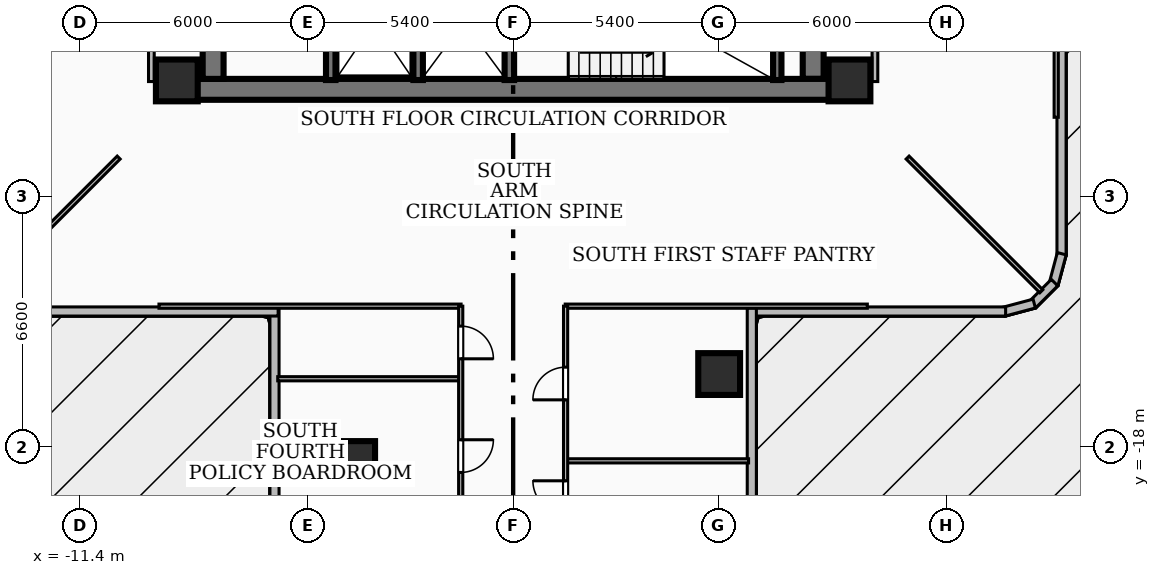
"""IFC4 building model, lengths in metres.
Left out: names, types, materials, properties, quantities, classifications, styles, units other than length and angle.
Written with IfcOpenShell. Run it as: python <this file> out.ifc"""

import sys

from ifc_helpers import new_model, si_unit, direction, frame, frame_2d, origin, origin_2d, place, context, subcontext, project, spatial, rectangle, extrude, element, fill, save


model = new_model("IFC4")
c1 = context("Model", 3, precision=1e-05, world=origin(), true_north=direction((0.0, 1.0)))
c2 = subcontext(c1, "Body", "Model", "MODEL_VIEW")
j1 = project(units=[si_unit("LENGTHUNIT", "METRE"), si_unit("PLANEANGLEUNIT", "RADIAN")], contexts=[c1])
p1 = place(None, origin())
s1 = spatial("IfcSite", under=j1, at=p1, CompositionType="ELEMENT")
p2 = place(p1, origin())
s2 = spatial("IfcBuilding", under=s1, at=p2, CompositionType="ELEMENT")
p3 = place(p2, frame((0.0, 0.0, 24.48)))
s3 = spatial("IfcBuildingStorey", under=s2, at=p3, CompositionType="ELEMENT", Elevation=24.48)
p4 = place(p3, frame((8.78, -8.585, 0.0), z_axis=(0.0, 0.0, 1.0), x_axis=(-1.0, 0.0, 0.0)))
e1 = element("IfcWall", 1, at=p4, inside=s3, PredefinedType="SHEAR", context=c2, shape_type="SweptSolid", body=[
    extrude(rectangle(XDim=17.56, YDim=0.55, at=frame_2d((8.78, 0.0))), origin(), (0.0, 0.0, 1.0), 3.34),
])
for number, where, z_axis, x_axis in (
    (2, (-7.895, -8.31, 0.0), (0.0, 0.0, 1.0), (0.0, 1.0, 0.0)),
    (3, (7.895, -2.025, 0.0), (0.0, 0.0, 1.0), (0.0, -1.0, 0.0)),
):
    element("IfcWall", number, at=place(p3, frame(where, z_axis=z_axis, x_axis=x_axis)), inside=s3, PredefinedType="SHEAR", context=c2, shape_type="SweptSolid", body=[
        extrude(rectangle(XDim=6.285, YDim=0.55, at=frame_2d((3.143, 0.0))), origin(), (0.0, 0.0, 1.0), 3.34),
    ])
p5 = place(p3, frame((6.95, -8.34, 0.0), z_axis=(0.0, 0.0, 1.0), x_axis=(0.0, 1.0, 0.0)))
e4 = element("IfcWall", 4, at=p5, inside=s3, PredefinedType="SOLIDWALL", context=c2, shape_type="SweptSolid", body=[
    extrude(rectangle(XDim=3.06, YDim=0.22, at=frame_2d((1.53, 0.0))), origin(), (0.0, 0.0, 1.0), 3.34),
])
for number, where, z_axis, x_axis in (
    (5, (-0.1, -8.34, 0.0), (0.0, 0.0, 1.0), (0.0, 1.0, 0.0)),
    (6, (-2.5, -8.34, 0.0), (0.0, 0.0, 1.0), (0.0, 1.0, 0.0)),
    (7, (-4.8, -8.34, 0.0), (0.0, 0.0, 1.0), (0.0, 1.0, 0.0)),
):
    element("IfcWall", number, at=place(p3, frame(where, z_axis=z_axis, x_axis=x_axis)), inside=s3, PredefinedType="SOLIDWALL", context=c2, shape_type="SweptSolid", body=[
        extrude(rectangle(XDim=3.04, YDim=0.25, at=frame_2d((1.52, 0.0))), origin(), (0.0, 0.0, 1.0), 3.34),
    ])
for number, where, z_axis, x_axis in (
    (8, (8.85, -8.35, 0.0), (0.0, 0.0, 1.0), (1.0, 0.0, 0.0)),
    (9, (-8.85, -8.35, 0.0), (0.0, 0.0, 1.0), (1.0, 0.0, 0.0)),
    (10, (-4.184, -18.391, 0.0), (0.0, 0.0, 1.0), (1.0, 0.0, 0.0)),
    (11, (5.421, -16.076, 0.0), (0.0, 0.0, 1.0), (1.0, 0.0, 0.0)),
):
    element("IfcColumn", number, at=place(p3, frame(where, z_axis=z_axis, x_axis=x_axis)), inside=s3, PredefinedType="COLUMN", context=c2, shape_type="SweptSolid", body=[
        extrude(rectangle(XDim=1.1, YDim=1.1, at=origin_2d()), origin(), (0.0, 0.0, 1.0), 3.6),
    ])
p6 = place(p3, frame((14.43, -6.184, 0.0), z_axis=(0.0, 0.0, 1.0), x_axis=(0.0, -1.0, 0.0)))
e12 = element("IfcWall", 12, at=p6, inside=s3, PredefinedType="SOLIDWALL", context=c2, shape_type="SweptSolid", body=[
    extrude(rectangle(XDim=6.775, YDim=0.24, at=frame_2d((3.387, 0.0))), origin(), (0.0, 0.0, 1.0), 3.34),
])
p7 = place(p3, frame((14.436, -12.91, 0.0), z_axis=(0.0, 0.0, 1.0), x_axis=(-0.257937227116, -0.966161677396, 0.0)))
e13 = element("IfcWall", 13, at=p7, inside=s3, PredefinedType="SOLIDWALL", context=c2, shape_type="SweptSolid", body=[
    extrude(rectangle(XDim=0.83, YDim=0.24, at=frame_2d((0.415, 0.0))), origin(), (0.0, 0.0, 1.0), 3.34),
])
p8 = place(p3, frame((14.246, -13.67, 0.0), z_axis=(0.0, 0.0, 1.0), x_axis=(-0.707106781187, -0.707106781187, 0.0)))
e14 = element("IfcWall", 14, at=p8, inside=s3, PredefinedType="SOLIDWALL", context=c2, shape_type="SweptSolid", body=[
    extrude(rectangle(XDim=0.815, YDim=0.24, at=frame_2d((0.407, 0.0))), origin(), (0.0, 0.0, 1.0), 3.34),
])
p9 = place(p3, frame((13.712, -14.222, 0.0), z_axis=(0.0, 0.0, 1.0), x_axis=(-0.966161677396, -0.257937227116, 0.0)))
e15 = element("IfcWall", 15, at=p9, inside=s3, PredefinedType="SOLIDWALL", context=c2, shape_type="SweptSolid", body=[
    extrude(rectangle(XDim=0.83, YDim=0.24, at=frame_2d((0.415, 0.0))), origin(), (0.0, 0.0, 1.0), 3.34),
])
p10 = place(p3, frame((12.959, -14.43, 0.0), z_axis=(0.0, 0.0, 1.0), x_axis=(-1.0, 0.0, 0.0)))
e16 = element("IfcWall", 16, at=p10, inside=s3, PredefinedType="SOLIDWALL", context=c2, shape_type="SweptSolid", body=[
    extrude(rectangle(XDim=6.775, YDim=0.24, at=frame_2d((3.387, 0.0))), origin(), (0.0, 0.0, 1.0), 2.421),
])
p11 = place(p3, frame((6.28, -14.334, 0.0), z_axis=(0.0, 0.0, 1.0), x_axis=(0.0, -1.0, 0.0)))
e17 = element("IfcWall", 17, at=p11, inside=s3, PredefinedType="SOLIDWALL", context=c2, shape_type="SweptSolid", body=[
    extrude(rectangle(XDim=13.475, YDim=0.24, at=frame_2d((6.738, 0.0))), origin(), (0.0, 0.0, 1.0), 2.421),
])
p12 = place(p3, frame((-6.28, -27.809, 0.0), z_axis=(0.0, 0.0, 1.0), x_axis=(0.0, 1.0, 0.0)))
e18 = element("IfcWall", 18, at=p12, inside=s3, PredefinedType="SOLIDWALL", context=c2, shape_type="SweptSolid", body=[
    extrude(rectangle(XDim=13.475, YDim=0.24, at=frame_2d((6.738, 0.0))), origin(), (0.0, 0.0, 1.0), 3.34),
])
p13 = place(p12, frame((1.1, 0.0, 0.85)))
e19 = element("IfcOpeningElement", 19, at=p13, cuts=e18, PredefinedType="OPENING", context=c2, shape_type="SweptSolid", body=[
    extrude(rectangle(XDim=1.5, YDim=1.8, at=frame_2d((0.75, 0.9))), frame((0.0, 0.13, 0.0), z_axis=(0.0, -1.0, 0.0), x_axis=(1.0, 0.0, 0.0)), (0.0, 0.0, 1.0), 0.26),
])
p14 = place(p3, frame((-6.184, -14.43, 0.0), z_axis=(0.0, 0.0, 1.0), x_axis=(-1.0, 0.0, 0.0)))
e20 = element("IfcWall", 20, at=p14, inside=s3, PredefinedType="SOLIDWALL", context=c2, shape_type="SweptSolid", body=[
    extrude(rectangle(XDim=6.775, YDim=0.24, at=frame_2d((3.387, 0.0))), origin(), (0.0, 0.0, 1.0), 3.34),
])
for number, where, z_axis, x_axis in (
    (21, (-9.52, -8.38, 0.0), (0.0, 0.0, 1.0), (0.0, 1.0, 0.0)),
    (22, (9.52, -8.38, 0.0), (0.0, 0.0, 1.0), (0.0, 1.0, 0.0)),
):
    element("IfcWall", number, at=place(p3, frame(where, z_axis=z_axis, x_axis=x_axis)), inside=s3, PredefinedType="PARTITIONING", context=c2, shape_type="SweptSolid", body=[
        extrude(rectangle(XDim=6.63, YDim=0.15, at=frame_2d((3.315, 0.0))), origin(), (0.0, 0.0, 1.0), 2.421),
    ])
for number, where, z_axis, x_axis in (
    (23, (-10.38, -10.38, 0.0), (0.0, 0.0, 1.0), (-0.707, -0.707, 0.0)),
    (24, (10.38, -10.38, 0.0), (0.0, 0.0, 1.0), (0.707, -0.707, 0.0)),
):
    element("IfcWall", number, at=place(p3, frame(where, z_axis=z_axis, x_axis=x_axis)), inside=s3, PredefinedType="PARTITIONING", context=c2, shape_type="SweptSolid", body=[
        extrude(rectangle(XDim=4.975, YDim=0.11, at=frame_2d((2.488, 0.0))), origin(), (0.0, 0.0, 1.0), 3.34),
    ])
for number, where, z_axis, x_axis in (
    (25, (14.29, -9.32, 0.0), (0.0, 0.0, 1.0), (0.0, 1.0, 0.0)),
    (26, (1.37, -14.29, 0.0), (0.0, 0.0, 1.0), (1.0, 0.0, 0.0)),
    (27, (-9.32, -14.29, 0.0), (0.0, 0.0, 1.0), (1.0, 0.0, 0.0)),
):
    element("IfcWall", number, at=place(p3, frame(where, z_axis=z_axis, x_axis=x_axis)), inside=s3, PredefinedType="PARTITIONING", context=c2, shape_type="SweptSolid", body=[
        extrude(rectangle(XDim=7.95, YDim=0.11, at=frame_2d((3.975, 0.0))), origin(), (0.0, 0.0, 1.0), 2.421),
    ])
for number, where, z_axis, x_axis in (
    (28, (1.4, -18.36, 0.0), (0.0, 0.0, 1.0), (1.0, 0.0, 0.0)),
    (29, (-6.195, -16.2, 0.0), (0.0, 0.0, 1.0), (1.0, 0.0, 0.0)),
):
    element("IfcWall", number, at=place(p3, frame(where, z_axis=z_axis, x_axis=x_axis)), inside=s3, PredefinedType="PARTITIONING", context=c2, shape_type="SweptSolid", body=[
        extrude(rectangle(XDim=4.795, YDim=0.11, at=frame_2d((2.397, 0.0))), origin(), (0.0, 0.0, 1.0), 2.421),
    ])
p15 = place(p3, frame((1.38, -20.27, 0.0), z_axis=(0.0, 0.0, 1.0), x_axis=(0.0, 1.0, 0.0)))
e30 = element("IfcWall", 30, at=p15, inside=s3, PredefinedType="PARTITIONING", context=c2, shape_type="SweptSolid", body=[
    extrude(rectangle(XDim=5.98, YDim=0.11, at=frame_2d((2.99, 0.0))), origin(), (0.0, 0.0, 1.0), 2.869),
])
p16 = place(p15, frame((3.515, 0.0, 0.0)))
e31 = element("IfcOpeningElement", 31, at=p16, cuts=e30, PredefinedType="OPENING", context=c2, shape_type="SweptSolid", body=[
    extrude(rectangle(XDim=0.86, YDim=2.04, at=frame_2d((0.43, 1.02))), frame((0.0, 0.065, 0.0), z_axis=(0.0, -1.0, 0.0), x_axis=(1.0, 0.0, 0.0)), (0.0, 0.0, 1.0), 0.13),
])
p17 = place(p15, frame((0.525, 0.0, 0.0)))
e32 = element("IfcOpeningElement", 32, at=p17, cuts=e30, PredefinedType="OPENING", context=c2, shape_type="SweptSolid", body=[
    extrude(rectangle(XDim=0.86, YDim=2.04, at=frame_2d((0.43, 1.02))), frame((0.0, 0.065, 0.0), z_axis=(0.0, -1.0, 0.0), x_axis=(1.0, 0.0, 0.0)), (0.0, 0.0, 1.0), 0.13),
])
p18 = place(p3, frame((-1.38, -14.29, 0.0), z_axis=(0.0, 0.0, 1.0), x_axis=(0.0, -1.0, 0.0)))
e33 = element("IfcWall", 33, at=p18, inside=s3, PredefinedType="PARTITIONING", context=c2, shape_type="SweptSolid", body=[
    extrude(rectangle(XDim=5.98, YDim=0.11, at=frame_2d((2.99, 0.0))), origin(), (0.0, 0.0, 1.0), 2.869),
])
p19 = place(p18, frame((0.525, 0.0, 0.0)))
e34 = element("IfcOpeningElement", 34, at=p19, cuts=e33, PredefinedType="OPENING", context=c2, shape_type="SweptSolid", body=[
    extrude(rectangle(XDim=0.86, YDim=2.04, at=frame_2d((0.43, 1.02))), frame((0.0, 0.065, 0.0), z_axis=(0.0, -1.0, 0.0), x_axis=(1.0, 0.0, 0.0)), (0.0, 0.0, 1.0), 0.13),
])
p20 = place(p18, frame((3.515, 0.0, 0.0)))
e35 = element("IfcOpeningElement", 35, at=p20, cuts=e33, PredefinedType="OPENING", context=c2, shape_type="SweptSolid", body=[
    extrude(rectangle(XDim=0.86, YDim=2.04, at=frame_2d((0.43, 1.02))), frame((0.0, 0.065, 0.0), z_axis=(0.0, -1.0, 0.0), x_axis=(1.0, 0.0, 0.0)), (0.0, 0.0, 1.0), 0.13),
])
p21 = place(p16, origin())
e36 = element("IfcDoor", 36, at=p21, inside=s3, OperationType="SINGLE_SWING_LEFT", PredefinedType="DOOR", context=c2, shape_type="SweptSolid", body=[
    extrude(rectangle(XDim=0.86, YDim=2.04, at=frame_2d((0.43, 1.02))), frame((0.0, 0.025, 0.0), z_axis=(0.0, -1.0, 0.0), x_axis=(1.0, 0.0, 0.0)), (0.0, 0.0, 1.0), 0.05),
])
fill(e31, e36)
p22 = place(p17, origin())
e37 = element("IfcDoor", 37, at=p22, inside=s3, OperationType="SINGLE_SWING_RIGHT", PredefinedType="DOOR", context=c2, shape_type="SweptSolid", body=[
    extrude(rectangle(XDim=0.86, YDim=2.04, at=frame_2d((0.43, 1.02))), frame((0.0, 0.025, 0.0), z_axis=(0.0, -1.0, 0.0), x_axis=(1.0, 0.0, 0.0)), (0.0, 0.0, 1.0), 0.05),
])
fill(e32, e37)
p23 = place(p19, origin())
e38 = element("IfcDoor", 38, at=p23, inside=s3, OperationType="SINGLE_SWING_RIGHT", PredefinedType="DOOR", context=c2, shape_type="SweptSolid", body=[
    extrude(rectangle(XDim=0.86, YDim=2.04, at=frame_2d((0.43, 1.02))), frame((0.0, 0.025, 0.0), z_axis=(0.0, -1.0, 0.0), x_axis=(1.0, 0.0, 0.0)), (0.0, 0.0, 1.0), 0.05),
])
fill(e34, e38)
p24 = place(p20, origin())
e39 = element("IfcDoor", 39, at=p24, inside=s3, OperationType="SINGLE_SWING_LEFT", PredefinedType="DOOR", context=c2, shape_type="SweptSolid", body=[
    extrude(rectangle(XDim=0.86, YDim=2.04, at=frame_2d((0.43, 1.02))), frame((0.0, 0.025, 0.0), z_axis=(0.0, -1.0, 0.0), x_axis=(1.0, 0.0, 0.0)), (0.0, 0.0, 1.0), 0.05),
])
fill(e35, e39)
save(model, sys.argv[1])
